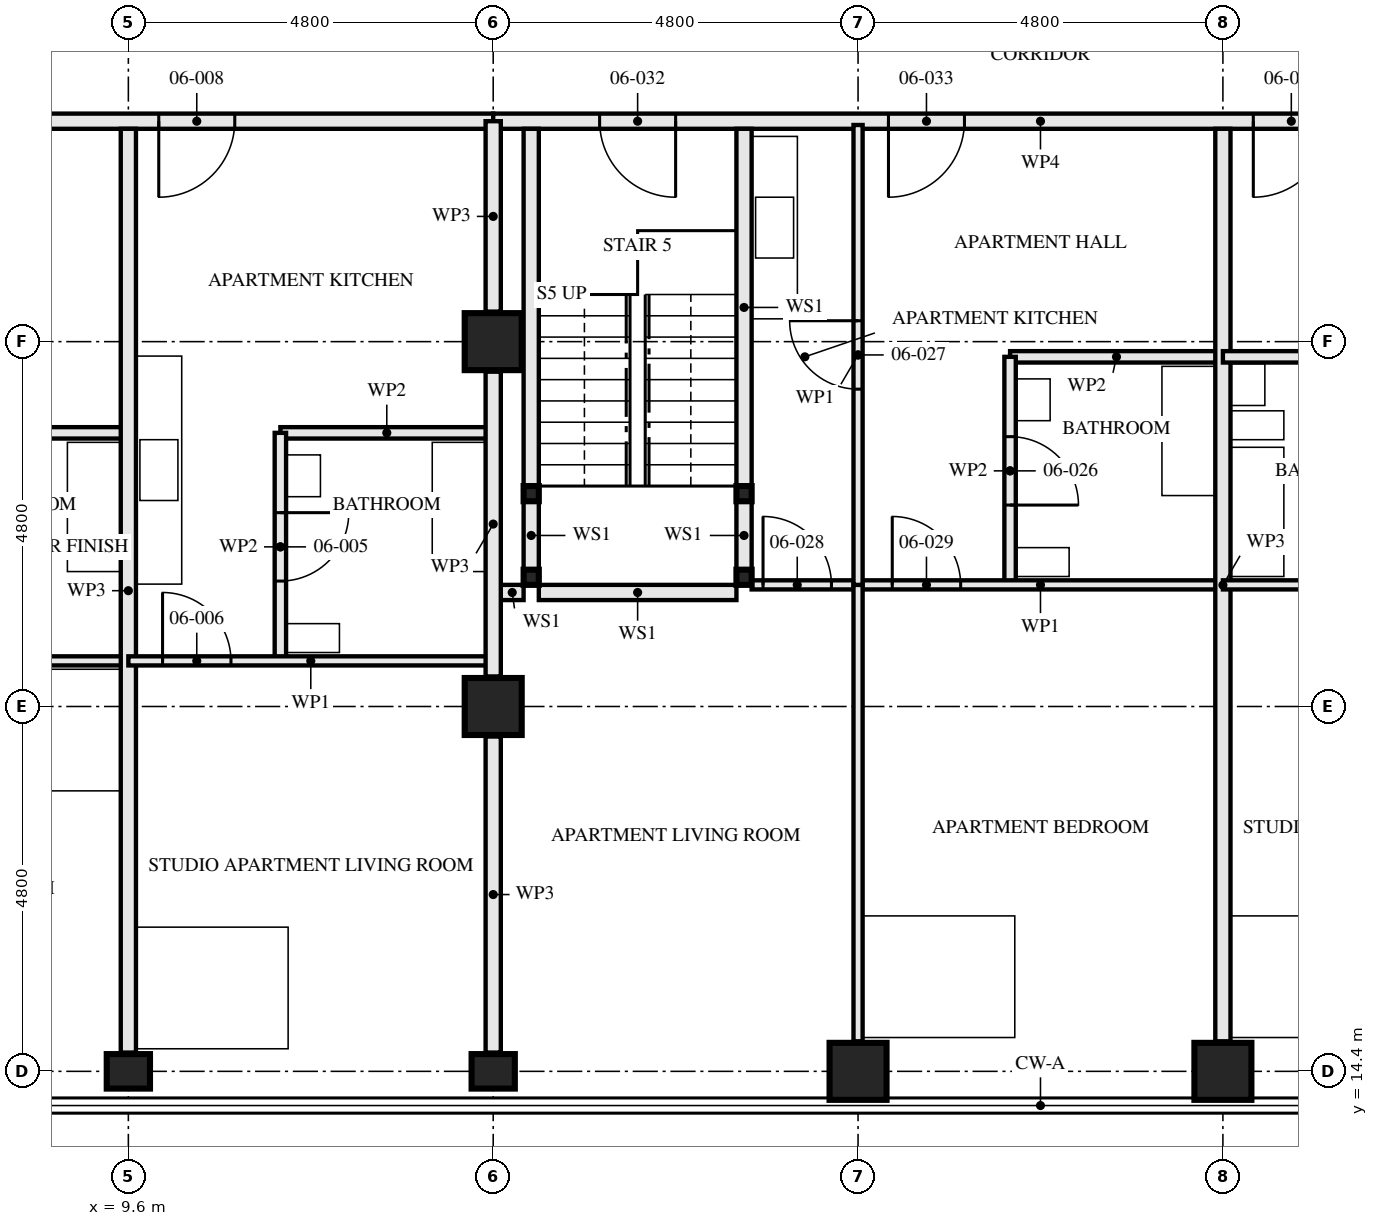
"""IFC4 building model, lengths in metres.
Left out: names, types, materials, properties, quantities, classifications, styles, units other than length and angle.
Written with IfcOpenShell. Run it as: python <this file> out.ifc"""

import sys

from ifc_helpers import new_model, si_unit, direction, frame, frame_2d, origin, origin_2d, place, context, subcontext, project, spatial, rectangle, hollow_rectangle, i_section, extrude, element, fill, save


model = new_model("IFC4")
c1 = context("Model", 3, precision=1e-05, world=origin(), true_north=direction((0.0, 1.0)))
c2 = subcontext(c1, "Body", "Model", "MODEL_VIEW")
j1 = project(units=[si_unit("LENGTHUNIT", "METRE"), si_unit("PLANEANGLEUNIT", "RADIAN")], contexts=[c1])
p1 = place(None, origin())
s1 = spatial("IfcSite", under=j1, at=p1, CompositionType="ELEMENT")
p2 = place(p1, origin())
s2 = spatial("IfcBuilding", under=s1, at=p2, CompositionType="ELEMENT")
p3 = place(p2, frame((0.0, 0.0, 27.0)))
s3 = spatial("IfcBuildingStorey", under=s2, at=p3, CompositionType="ELEMENT", Elevation=27.0)
for number, where, z_axis, x_axis in (
    (1, (9.6, 14.4, 0.0), (0.0, 0.0, 1.0), (0.0, 1.0, 0.0)),
    (2, (14.4, 14.4, 0.0), (0.0, 0.0, 1.0), (0.0, 1.0, 0.0)),
):
    element("IfcColumn", number, at=place(p3, frame(where, z_axis=z_axis, x_axis=x_axis)), inside=s3, PredefinedType="COLUMN", context=c2, shape_type="SweptSolid", body=[
        extrude(i_section(OverallWidth=0.454, OverallDepth=0.569, WebThickness=0.078, FlangeThickness=0.125, FilletRadius=0.015, at=origin_2d()), origin(), (0.0, 0.0, 1.0), 3.5),
    ])
for number, where, z_axis, x_axis in (
    (3, (14.4, 19.2, 0.0), (0.0, 0.0, 1.0), (1.0, 0.0, 0.0)),
    (4, (14.4, 24.0, 0.0), (0.0, 0.0, 1.0), (1.0, 0.0, 0.0)),
    (5, (19.2, 14.4, 0.0), (0.0, 0.0, 1.0), (0.0, 1.0, 0.0)),
    (6, (24.0, 14.4, 0.0), (0.0, 0.0, 1.0), (0.0, 1.0, 0.0)),
):
    element("IfcColumn", number, at=place(p3, frame(where, z_axis=z_axis, x_axis=x_axis)), inside=s3, PredefinedType="COLUMN", context=c2, shape_type="SweptSolid", body=[
        extrude(hollow_rectangle(XDim=0.75, YDim=0.75, WallThickness=0.08, at=origin_2d()), origin(), (0.0, 0.0, 1.0), 3.5),
    ])
for number, where, z_axis, x_axis in (
    (7, (14.9, 20.9, 0.0), (0.0, 0.0, 1.0), (1.0, 0.0, 0.0)),
    (8, (17.7, 20.9, 0.0), (0.0, 0.0, 1.0), (1.0, 0.0, 0.0)),
    (9, (14.9, 22.0, 0.0), (0.0, 0.0, 1.0), (1.0, 0.0, 0.0)),
    (10, (17.7, 22.0, 0.0), (0.0, 0.0, 1.0), (1.0, 0.0, 0.0)),
):
    element("IfcColumn", number, at=place(p3, frame(where, z_axis=z_axis, x_axis=x_axis)), inside=s3, PredefinedType="COLUMN", context=c2, shape_type="SweptSolid", body=[
        extrude(hollow_rectangle(XDim=0.2, YDim=0.2, WallThickness=0.008, at=origin_2d()), origin(), (0.0, 0.0, 1.0), 3.33),
    ])
p4 = place(p3, frame((6.8, 22.8, 0.0), z_axis=(0.0, 0.0, 1.0), x_axis=(1.0, 0.0, 0.0)))
e11 = element("IfcWall", 11, at=p4, inside=s3, PredefinedType="PARTITIONING", context=c2, shape_type="SweptSolid", body=[
    extrude(rectangle(XDim=2.8, YDim=0.15, at=frame_2d((1.4, 0.0))), origin(), (0.0, 0.0, 1.0), 3.33),
])
p5 = place(p3, frame((4.8, 19.8, 0.0), z_axis=(0.0, 0.0, 1.0), x_axis=(1.0, 0.0, 0.0)))
e12 = element("IfcWall", 12, at=p5, inside=s3, PredefinedType="PARTITIONING", context=c2, shape_type="SweptSolid", body=[
    extrude(rectangle(XDim=4.8, YDim=0.12, at=frame_2d((2.4, 0.0))), origin(), (0.0, 0.0, 1.0), 3.33),
])
p6 = place(p5, frame((0.925, 0.0, 0.0)))
e13 = element("IfcOpeningElement", 13, at=p6, cuts=e12, PredefinedType="OPENING", context=c2, shape_type="SweptSolid", body=[
    extrude(rectangle(XDim=0.9, YDim=2.1, at=frame_2d((0.45, 1.05))), frame((0.0, 0.071, 0.0), z_axis=(0.0, -1.0, 0.0), x_axis=(1.0, 0.0, 0.0)), (0.0, 0.0, 1.0), 0.141),
])
p7 = place(p3, frame((9.6, 14.647, 0.0), z_axis=(0.0, 0.0, 1.0), x_axis=(0.0, 1.0, 0.0)))
e14 = element("IfcWall", 14, at=p7, inside=s3, PredefinedType="PARTITIONING", context=c2, shape_type="SweptSolid", body=[
    extrude(rectangle(XDim=12.153, YDim=0.2, at=frame_2d((6.077, 0.0))), origin(), (0.0, 0.0, 1.0), 2.55),
])
p8 = place(p3, frame((11.6, 19.8, 0.0), z_axis=(0.0, 0.0, 1.0), x_axis=(0.0, 1.0, 0.0)))
e15 = element("IfcWall", 15, at=p8, inside=s3, PredefinedType="PARTITIONING", context=c2, shape_type="SweptSolid", body=[
    extrude(rectangle(XDim=3.0, YDim=0.15, at=frame_2d((1.5, 0.0))), origin(), (0.0, 0.0, 1.0), 3.33),
])
p9 = place(p8, frame((1.05, 0.0, 0.0)))
e16 = element("IfcOpeningElement", 16, at=p9, cuts=e15, PredefinedType="OPENING", context=c2, shape_type="SweptSolid", body=[
    extrude(rectangle(XDim=0.9, YDim=2.1, at=frame_2d((0.45, 1.05))), frame((0.0, 0.085, 0.0), z_axis=(0.0, -1.0, 0.0), x_axis=(1.0, 0.0, 0.0)), (0.0, 0.0, 1.0), 0.171),
])
p10 = place(p3, frame((11.6, 22.8, 0.0), z_axis=(0.0, 0.0, 1.0), x_axis=(1.0, 0.0, 0.0)))
e17 = element("IfcWall", 17, at=p10, inside=s3, PredefinedType="PARTITIONING", context=c2, shape_type="SweptSolid", body=[
    extrude(rectangle(XDim=2.8, YDim=0.15, at=frame_2d((1.4, 0.0))), origin(), (0.0, 0.0, 1.0), 3.33),
])
p11 = place(p3, frame((9.6, 19.8, 0.0), z_axis=(0.0, 0.0, 1.0), x_axis=(1.0, 0.0, 0.0)))
e18 = element("IfcWall", 18, at=p11, inside=s3, PredefinedType="PARTITIONING", context=c2, shape_type="SweptSolid", body=[
    extrude(rectangle(XDim=4.8, YDim=0.12, at=frame_2d((2.4, 0.0))), origin(), (0.0, 0.0, 1.0), 3.33),
])
p12 = place(p11, frame((0.45, 0.0, 0.0)))
e19 = element("IfcOpeningElement", 19, at=p12, cuts=e18, PredefinedType="OPENING", context=c2, shape_type="SweptSolid", body=[
    extrude(rectangle(XDim=0.9, YDim=2.1, at=frame_2d((0.45, 1.05))), frame((0.0, 0.071, 0.0), z_axis=(0.0, -1.0, 0.0), x_axis=(1.0, 0.0, 0.0)), (0.0, 0.0, 1.0), 0.141),
])
p13 = place(p3, frame((4.8, 26.9, 0.0), z_axis=(0.0, 0.0, 1.0), x_axis=(1.0, 0.0, 0.0)))
e20 = element("IfcWall", 20, at=p13, inside=s3, PredefinedType="PARTITIONING", context=c2, shape_type="SweptSolid", body=[
    extrude(rectangle(XDim=9.6, YDim=0.2, at=frame_2d((4.8, 0.0))), origin(), (0.0, 0.0, 1.0), 3.33),
])
p14 = place(p13, frame((0.4, 0.0, 0.0)))
e21 = element("IfcOpeningElement", 21, at=p14, cuts=e20, PredefinedType="OPENING", context=c2, shape_type="SweptSolid", body=[
    extrude(rectangle(XDim=1.0, YDim=2.1, at=frame_2d((0.5, 1.05))), frame((0.0, 0.111, 0.0), z_axis=(0.0, -1.0, 0.0), x_axis=(1.0, 0.0, 0.0)), (0.0, 0.0, 1.0), 0.221),
])
p15 = place(p13, frame((5.2, 0.0, 0.0)))
e22 = element("IfcOpeningElement", 22, at=p15, cuts=e20, PredefinedType="OPENING", context=c2, shape_type="SweptSolid", body=[
    extrude(rectangle(XDim=1.0, YDim=2.1, at=frame_2d((0.5, 1.05))), frame((0.0, 0.111, 0.0), z_axis=(0.0, -1.0, 0.0), x_axis=(1.0, 0.0, 0.0)), (0.0, 0.0, 1.0), 0.221),
])
p16 = place(p3, frame((14.9, 21.0, 0.0), z_axis=(0.0, 0.0, 1.0), x_axis=(0.0, 1.0, 0.0)))
e23 = element("IfcWall", 23, at=p16, inside=s3, PredefinedType="SOLIDWALL", context=c2, shape_type="SweptSolid", body=[
    extrude(rectangle(XDim=0.9, YDim=0.2, at=frame_2d((0.45, 0.0))), origin(), (0.0, 0.0, 1.0), 2.99),
])
p17 = place(p3, frame((14.9, 22.1, 0.0), z_axis=(0.0, 0.0, 1.0), x_axis=(0.0, 1.0, 0.0)))
e24 = element("IfcWall", 24, at=p17, inside=s3, PredefinedType="SOLIDWALL", context=c2, shape_type="SweptSolid", body=[
    extrude(rectangle(XDim=4.7, YDim=0.2, at=frame_2d((2.35, 0.0))), origin(), (0.0, 0.0, 1.0), 2.99),
])
p18 = place(p3, frame((17.7, 21.0, 0.0), z_axis=(0.0, 0.0, 1.0), x_axis=(0.0, 1.0, 0.0)))
e25 = element("IfcWall", 25, at=p18, inside=s3, PredefinedType="SOLIDWALL", context=c2, shape_type="SweptSolid", body=[
    extrude(rectangle(XDim=0.9, YDim=0.2, at=frame_2d((0.45, 0.0))), origin(), (0.0, 0.0, 1.0), 2.99),
])
p19 = place(p3, frame((17.7, 22.1, 0.0), z_axis=(0.0, 0.0, 1.0), x_axis=(0.0, 1.0, 0.0)))
e26 = element("IfcWall", 26, at=p19, inside=s3, PredefinedType="SOLIDWALL", context=c2, shape_type="SweptSolid", body=[
    extrude(rectangle(XDim=4.7, YDim=0.2, at=frame_2d((2.35, 0.0))), origin(), (0.0, 0.0, 1.0), 2.99),
])
p20 = place(p3, frame((14.5, 20.7, 0.0), z_axis=(0.0, 0.0, 1.0), x_axis=(1.0, 0.0, 0.0)))
e27 = element("IfcWall", 27, at=p20, inside=s3, PredefinedType="SOLIDWALL", context=c2, shape_type="SweptSolid", body=[
    extrude(rectangle(XDim=0.3, YDim=0.2, at=frame_2d((0.15, 0.0))), origin(), (0.0, 0.0, 1.0), 3.33),
])
p21 = place(p3, frame((15.0, 20.7, 0.0), z_axis=(0.0, 0.0, 1.0), x_axis=(1.0, 0.0, 0.0)))
e28 = element("IfcWall", 28, at=p21, inside=s3, PredefinedType="SOLIDWALL", context=c2, shape_type="SweptSolid", body=[
    extrude(rectangle(XDim=2.6, YDim=0.2, at=frame_2d((1.3, 0.0))), origin(), (0.0, 0.0, 1.0), 3.33),
])
p22 = place(p3, frame((21.2, 20.8, 0.0), z_axis=(0.0, 0.0, 1.0), x_axis=(0.0, 1.0, 0.0)))
e29 = element("IfcWall", 29, at=p22, inside=s3, PredefinedType="PARTITIONING", context=c2, shape_type="SweptSolid", body=[
    extrude(rectangle(XDim=3.0, YDim=0.15, at=frame_2d((1.5, 0.0))), origin(), (0.0, 0.0, 1.0), 3.33),
])
p23 = place(p22, frame((1.05, 0.0, 0.0)))
e30 = element("IfcOpeningElement", 30, at=p23, cuts=e29, PredefinedType="OPENING", context=c2, shape_type="SweptSolid", body=[
    extrude(rectangle(XDim=0.9, YDim=2.1, at=frame_2d((0.45, 1.05))), frame((0.0, 0.085, 0.0), z_axis=(0.0, -1.0, 0.0), x_axis=(1.0, 0.0, 0.0)), (0.0, 0.0, 1.0), 0.171),
])
p24 = place(p3, frame((21.2, 23.8, 0.0), z_axis=(0.0, 0.0, 1.0), x_axis=(1.0, 0.0, 0.0)))
e31 = element("IfcWall", 31, at=p24, inside=s3, PredefinedType="PARTITIONING", context=c2, shape_type="SweptSolid", body=[
    extrude(rectangle(XDim=2.8, YDim=0.15, at=frame_2d((1.4, 0.0))), origin(), (0.0, 0.0, 1.0), 3.33),
])
p25 = place(p3, frame((19.2, 20.8, 0.0), z_axis=(0.0, 0.0, 1.0), x_axis=(0.0, 1.0, 0.0)))
e32 = element("IfcWall", 32, at=p25, inside=s3, PredefinedType="PARTITIONING", context=c2, shape_type="SweptSolid", body=[
    extrude(rectangle(XDim=6.05, YDim=0.12, at=frame_2d((3.025, 0.0))), origin(), (0.0, 0.0, 1.0), 2.55),
])
p26 = place(p25, frame((2.575, 0.0, 0.0)))
e33 = element("IfcOpeningElement", 33, at=p26, cuts=e32, PredefinedType="OPENING", context=c2, shape_type="SweptSolid", body=[
    extrude(rectangle(XDim=0.9, YDim=2.1, at=frame_2d((0.45, 1.05))), frame((0.0, 0.071, 0.0), z_axis=(0.0, -1.0, 0.0), x_axis=(1.0, 0.0, 0.0)), (0.0, 0.0, 1.0), 0.141),
])
p27 = place(p3, frame((17.8, 20.8, 0.0), z_axis=(0.0, 0.0, 1.0), x_axis=(1.0, 0.0, 0.0)))
e34 = element("IfcWall", 34, at=p27, inside=s3, PredefinedType="PARTITIONING", context=c2, shape_type="SweptSolid", body=[
    extrude(rectangle(XDim=1.4, YDim=0.12, at=frame_2d((0.7, 0.0))), origin(), (0.0, 0.0, 1.0), 3.33),
])
p28 = place(p27, frame((0.15, 0.0, 0.0)))
e35 = element("IfcOpeningElement", 35, at=p28, cuts=e34, PredefinedType="OPENING", context=c2, shape_type="SweptSolid", body=[
    extrude(rectangle(XDim=0.9, YDim=2.1, at=frame_2d((0.45, 1.05))), frame((0.0, 0.071, 0.0), z_axis=(0.0, -1.0, 0.0), x_axis=(1.0, 0.0, 0.0)), (0.0, 0.0, 1.0), 0.141),
])
p29 = place(p3, frame((19.2, 20.8, 0.0), z_axis=(0.0, 0.0, 1.0), x_axis=(1.0, 0.0, 0.0)))
e36 = element("IfcWall", 36, at=p29, inside=s3, PredefinedType="PARTITIONING", context=c2, shape_type="SweptSolid", body=[
    extrude(rectangle(XDim=4.8, YDim=0.12, at=frame_2d((2.4, 0.0))), origin(), (0.0, 0.0, 1.0), 3.33),
])
p30 = place(p29, frame((0.45, 0.0, 0.0)))
e37 = element("IfcOpeningElement", 37, at=p30, cuts=e36, PredefinedType="OPENING", context=c2, shape_type="SweptSolid", body=[
    extrude(rectangle(XDim=0.9, YDim=2.1, at=frame_2d((0.45, 1.05))), frame((0.0, 0.071, 0.0), z_axis=(0.0, -1.0, 0.0), x_axis=(1.0, 0.0, 0.0)), (0.0, 0.0, 1.0), 0.141),
])
p31 = place(p3, frame((19.2, 14.795, 0.0), z_axis=(0.0, 0.0, 1.0), x_axis=(0.0, 1.0, 0.0)))
e38 = element("IfcWall", 38, at=p31, inside=s3, PredefinedType="PARTITIONING", context=c2, shape_type="SweptSolid", body=[
    extrude(rectangle(XDim=6.005, YDim=0.12, at=frame_2d((3.002, 0.0))), origin(), (0.0, 0.0, 1.0), 2.55),
])
p32 = place(p3, frame((24.0, 14.795, 0.0), z_axis=(0.0, 0.0, 1.0), x_axis=(0.0, 1.0, 0.0)))
e39 = element("IfcWall", 39, at=p32, inside=s3, PredefinedType="PARTITIONING", context=c2, shape_type="SweptSolid", body=[
    extrude(rectangle(XDim=12.005, YDim=0.2, at=frame_2d((6.002, 0.0))), origin(), (0.0, 0.0, 1.0), 2.55),
])
p33 = place(p3, frame((24.0, 23.8, 0.0), z_axis=(0.0, 0.0, 1.0), x_axis=(1.0, 0.0, 0.0)))
e40 = element("IfcWall", 40, at=p33, inside=s3, PredefinedType="PARTITIONING", context=c2, shape_type="SweptSolid", body=[
    extrude(rectangle(XDim=2.8, YDim=0.15, at=frame_2d((1.4, 0.0))), origin(), (0.0, 0.0, 1.0), 3.33),
])
p34 = place(p3, frame((24.0, 20.8, 0.0), z_axis=(0.0, 0.0, 1.0), x_axis=(1.0, 0.0, 0.0)))
e41 = element("IfcWall", 41, at=p34, inside=s3, PredefinedType="PARTITIONING", context=c2, shape_type="SweptSolid", body=[
    extrude(rectangle(XDim=4.8, YDim=0.12, at=frame_2d((2.4, 0.0))), origin(), (0.0, 0.0, 1.0), 3.33),
])
p35 = place(p34, frame((3.45, 0.0, 0.0)))
e42 = element("IfcOpeningElement", 42, at=p35, cuts=e41, PredefinedType="OPENING", context=c2, shape_type="SweptSolid", body=[
    extrude(rectangle(XDim=0.9, YDim=2.1, at=frame_2d((0.45, 1.05))), frame((0.0, 0.071, 0.0), z_axis=(0.0, -1.0, 0.0), x_axis=(1.0, 0.0, 0.0)), (0.0, 0.0, 1.0), 0.141),
])
p36 = place(p3, frame((14.4, 26.9, 0.0), z_axis=(0.0, 0.0, 1.0), x_axis=(1.0, 0.0, 0.0)))
e43 = element("IfcWall", 43, at=p36, inside=s3, PredefinedType="PARTITIONING", context=c2, shape_type="SweptSolid", body=[
    extrude(rectangle(XDim=14.4, YDim=0.2, at=frame_2d((7.2, 0.0))), origin(), (0.0, 0.0, 1.0), 2.55),
])
p37 = place(p36, frame((1.4, 0.0, 0.0)))
e44 = element("IfcOpeningElement", 44, at=p37, cuts=e43, PredefinedType="OPENING", context=c2, shape_type="SweptSolid", body=[
    extrude(rectangle(XDim=1.0, YDim=2.1, at=frame_2d((0.5, 1.05))), frame((0.0, 0.111, 0.0), z_axis=(0.0, -1.0, 0.0), x_axis=(1.0, 0.0, 0.0)), (0.0, 0.0, 1.0), 0.221),
])
p38 = place(p36, frame((5.2, 0.0, 0.0)))
e45 = element("IfcOpeningElement", 45, at=p38, cuts=e43, PredefinedType="OPENING", context=c2, shape_type="SweptSolid", body=[
    extrude(rectangle(XDim=1.0, YDim=2.1, at=frame_2d((0.5, 1.05))), frame((0.0, 0.111, 0.0), z_axis=(0.0, -1.0, 0.0), x_axis=(1.0, 0.0, 0.0)), (0.0, 0.0, 1.0), 0.221),
])
p39 = place(p36, frame((10.0, 0.0, 0.0)))
e46 = element("IfcOpeningElement", 46, at=p39, cuts=e43, PredefinedType="OPENING", context=c2, shape_type="SweptSolid", body=[
    extrude(rectangle(XDim=1.0, YDim=2.1, at=frame_2d((0.5, 1.05))), frame((0.0, 0.111, 0.0), z_axis=(0.0, -1.0, 0.0), x_axis=(1.0, 0.0, 0.0)), (0.0, 0.0, 1.0), 0.221),
])
p40 = place(p3, frame((14.4, 14.647, 0.0), z_axis=(0.0, 0.0, 1.0), x_axis=(0.0, 1.0, 0.0)))
e47 = element("IfcWall", 47, at=p40, inside=s3, PredefinedType="PARTITIONING", context=c2, shape_type="SweptSolid", body=[
    extrude(rectangle(XDim=4.158, YDim=0.2, at=frame_2d((2.079, 0.0))), origin(), (0.0, 0.0, 1.0), 2.32),
])
p41 = place(p3, frame((14.4, 19.595, 0.0), z_axis=(0.0, 0.0, 1.0), x_axis=(0.0, 1.0, 0.0)))
e48 = element("IfcWall", 48, at=p41, inside=s3, PredefinedType="PARTITIONING", context=c2, shape_type="SweptSolid", body=[
    extrude(rectangle(XDim=4.01, YDim=0.2, at=frame_2d((2.005, 0.0))), origin(), (0.0, 0.0, 1.0), 2.32),
])
p42 = place(p3, frame((14.4, 24.395, 0.0), z_axis=(0.0, 0.0, 1.0), x_axis=(0.0, 1.0, 0.0)))
e49 = element("IfcWall", 49, at=p42, inside=s3, PredefinedType="PARTITIONING", context=c2, shape_type="SweptSolid", body=[
    extrude(rectangle(XDim=2.505, YDim=0.2, at=frame_2d((1.252, 0.0))), origin(), (0.0, 0.0, 1.0), 2.32),
])
p43 = place(p9, frame((0.9, 0.0, 0.0), z_axis=(0.0, 0.0, 1.0), x_axis=(-1.0, 0.0, 0.0)))
e50 = element("IfcDoor", 50, at=p43, inside=s3, OperationType="SINGLE_SWING_RIGHT", PredefinedType="DOOR", context=c2, shape_type="SweptSolid", body=[
    extrude(rectangle(XDim=0.9, YDim=2.1, at=frame_2d((0.45, 1.05))), frame((0.0, 0.022, 0.0), z_axis=(0.0, -1.0, 0.0), x_axis=(1.0, 0.0, 0.0)), (0.0, 0.0, 1.0), 0.044),
])
fill(e16, e50)
p44 = place(p12, origin())
e51 = element("IfcDoor", 51, at=p44, inside=s3, OperationType="SINGLE_SWING_RIGHT", PredefinedType="DOOR", context=c2, shape_type="SweptSolid", body=[
    extrude(rectangle(XDim=0.9, YDim=2.1, at=frame_2d((0.45, 1.05))), frame((0.0, 0.022, 0.0), z_axis=(0.0, -1.0, 0.0), x_axis=(1.0, 0.0, 0.0)), (0.0, 0.0, 1.0), 0.044),
])
fill(e19, e51)
p45 = place(p15, frame((1.0, 0.0, 0.0), z_axis=(0.0, 0.0, 1.0), x_axis=(-1.0, 0.0, 0.0)))
e52 = element("IfcDoor", 52, at=p45, inside=s3, OperationType="SINGLE_SWING_LEFT", PredefinedType="DOOR", context=c2, shape_type="SweptSolid", body=[
    extrude(rectangle(XDim=1.0, YDim=2.1, at=frame_2d((0.5, 1.05))), frame((0.0, 0.027, 0.0), z_axis=(0.0, -1.0, 0.0), x_axis=(1.0, 0.0, 0.0)), (0.0, 0.0, 1.0), 0.054),
])
fill(e22, e52)
p46 = place(p23, frame((0.9, 0.0, 0.0), z_axis=(0.0, 0.0, 1.0), x_axis=(-1.0, 0.0, 0.0)))
e53 = element("IfcDoor", 53, at=p46, inside=s3, OperationType="SINGLE_SWING_LEFT", PredefinedType="DOOR", context=c2, shape_type="SweptSolid", body=[
    extrude(rectangle(XDim=0.9, YDim=2.1, at=frame_2d((0.45, 1.05))), frame((0.0, 0.022, 0.0), z_axis=(0.0, -1.0, 0.0), x_axis=(1.0, 0.0, 0.0)), (0.0, 0.0, 1.0), 0.044),
])
fill(e30, e53)
p47 = place(p26, origin())
e54 = element("IfcDoor", 54, at=p47, inside=s3, OperationType="SINGLE_SWING_LEFT", PredefinedType="DOOR", context=c2, shape_type="SweptSolid", body=[
    extrude(rectangle(XDim=0.9, YDim=2.1, at=frame_2d((0.45, 1.05))), frame((0.0, 0.022, 0.0), z_axis=(0.0, -1.0, 0.0), x_axis=(1.0, 0.0, 0.0)), (0.0, 0.0, 1.0), 0.044),
])
fill(e33, e54)
p48 = place(p28, origin())
e55 = element("IfcDoor", 55, at=p48, inside=s3, OperationType="SINGLE_SWING_RIGHT", PredefinedType="DOOR", context=c2, shape_type="SweptSolid", body=[
    extrude(rectangle(XDim=0.9, YDim=2.1, at=frame_2d((0.45, 1.05))), frame((0.0, 0.022, 0.0), z_axis=(0.0, -1.0, 0.0), x_axis=(1.0, 0.0, 0.0)), (0.0, 0.0, 1.0), 0.044),
])
fill(e35, e55)
p49 = place(p30, origin())
e56 = element("IfcDoor", 56, at=p49, inside=s3, OperationType="SINGLE_SWING_RIGHT", PredefinedType="DOOR", context=c2, shape_type="SweptSolid", body=[
    extrude(rectangle(XDim=0.9, YDim=2.1, at=frame_2d((0.45, 1.05))), frame((0.0, 0.022, 0.0), z_axis=(0.0, -1.0, 0.0), x_axis=(1.0, 0.0, 0.0)), (0.0, 0.0, 1.0), 0.044),
])
fill(e37, e56)
p50 = place(p37, frame((1.0, 0.0, 0.0), z_axis=(0.0, 0.0, 1.0), x_axis=(-1.0, 0.0, 0.0)))
e57 = element("IfcDoor", 57, at=p50, inside=s3, OperationType="SINGLE_SWING_RIGHT", PredefinedType="DOOR", context=c2, shape_type="SweptSolid", body=[
    extrude(rectangle(XDim=1.0, YDim=2.1, at=frame_2d((0.5, 1.05))), frame((0.0, 0.032, 0.0), z_axis=(0.0, -1.0, 0.0), x_axis=(1.0, 0.0, 0.0)), (0.0, 0.0, 1.0), 0.064),
])
fill(e44, e57)
p51 = place(p38, frame((1.0, 0.0, 0.0), z_axis=(0.0, 0.0, 1.0), x_axis=(-1.0, 0.0, 0.0)))
e58 = element("IfcDoor", 58, at=p51, inside=s3, OperationType="SINGLE_SWING_LEFT", PredefinedType="DOOR", context=c2, shape_type="SweptSolid", body=[
    extrude(rectangle(XDim=1.0, YDim=2.1, at=frame_2d((0.5, 1.05))), frame((0.0, 0.027, 0.0), z_axis=(0.0, -1.0, 0.0), x_axis=(1.0, 0.0, 0.0)), (0.0, 0.0, 1.0), 0.054),
])
fill(e45, e58)
p52 = place(p39, frame((1.0, 0.0, 0.0), z_axis=(0.0, 0.0, 1.0), x_axis=(-1.0, 0.0, 0.0)))
e59 = element("IfcDoor", 59, at=p52, inside=s3, OperationType="SINGLE_SWING_LEFT", PredefinedType="DOOR", context=c2, shape_type="SweptSolid", body=[
    extrude(rectangle(XDim=1.0, YDim=2.1, at=frame_2d((0.5, 1.05))), frame((0.0, 0.027, 0.0), z_axis=(0.0, -1.0, 0.0), x_axis=(1.0, 0.0, 0.0)), (0.0, 0.0, 1.0), 0.054),
])
fill(e46, e59)
save(model, sys.argv[1])
